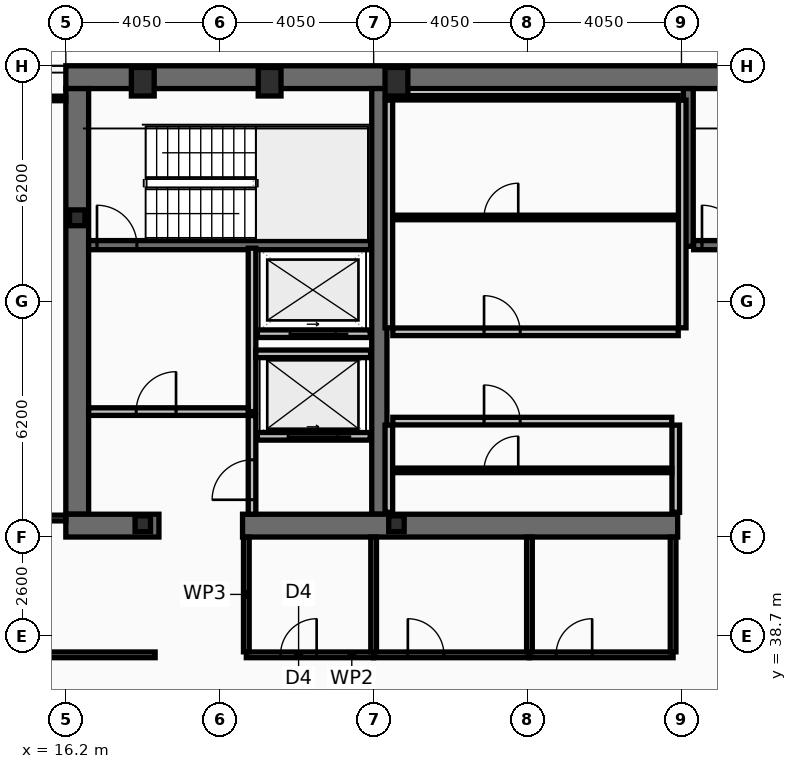
"""IFC4 building model, lengths in metres.
Left out: names, types, materials, properties, quantities, classifications, styles, units other than length and angle.
Written with IfcOpenShell. Run it as: python <this file> out.ifc"""

import sys

from ifc_helpers import new_model, si_unit, direction, frame, frame_2d, origin, origin_2d, place, context, subcontext, project, spatial, rectangle, hollow_rectangle, i_section, extrude, element, fill, save


model = new_model("IFC4")
c1 = context("Model", 3, precision=1e-05, world=origin(), true_north=direction((0.0, 1.0)))
c2 = subcontext(c1, "Body", "Model", "MODEL_VIEW")
j1 = project(units=[si_unit("LENGTHUNIT", "METRE"), si_unit("PLANEANGLEUNIT", "RADIAN")], contexts=[c1])
p1 = place(None, origin())
s1 = spatial("IfcSite", under=j1, at=p1, CompositionType="ELEMENT")
p2 = place(p1, origin())
s2 = spatial("IfcBuilding", under=s1, at=p2, CompositionType="ELEMENT")
p3 = place(p2, frame((0.0, 0.0, 224.6)))
s3 = spatial("IfcBuildingStorey", under=s2, at=p3, CompositionType="ELEMENT", Elevation=224.6)
p4 = place(p3, frame((16.2, 53.4, 0.0), z_axis=(0.0, 0.0, 1.0), x_axis=(1.0, 0.0, 0.0)))
e1 = element("IfcWall", 1, at=p4, inside=s3, PredefinedType="SHEAR", context=c2, shape_type="SweptSolid", body=[
    extrude(rectangle(XDim=40.5, YDim=0.6, at=frame_2d((20.25, 0.0))), origin(), (0.0, 0.0, 1.0), 3.44),
])
p5 = place(p3, frame((16.5, 41.9, 0.0), z_axis=(0.0, 0.0, 1.0), x_axis=(0.0, 1.0, 0.0)))
e2 = element("IfcWall", 2, at=p5, inside=s3, PredefinedType="SHEAR", context=c2, shape_type="SweptSolid", body=[
    extrude(rectangle(XDim=11.2, YDim=0.6, at=frame_2d((5.6, 0.0))), origin(), (0.0, 0.0, 1.0), 3.44),
])
p6 = place(p3, frame((24.45, 41.9, 0.0), z_axis=(0.0, 0.0, 1.0), x_axis=(0.0, 1.0, 0.0)))
e3 = element("IfcWall", 3, at=p6, inside=s3, PredefinedType="SHEAR", context=c2, shape_type="SweptSolid", body=[
    extrude(rectangle(XDim=11.2, YDim=0.4, at=frame_2d((5.6, 0.0))), origin(), (0.0, 0.0, 1.0), 3.44),
])
p7 = place(p3, frame((18.65, 41.6, 0.0), z_axis=(0.0, 0.0, 1.0), x_axis=(-1.0, 0.0, 0.0)))
e4 = element("IfcWall", 4, at=p7, inside=s3, PredefinedType="SHEAR", context=c2, shape_type="SweptSolid", body=[
    extrude(rectangle(XDim=2.45, YDim=0.6, at=frame_2d((1.225, 0.0))), origin(), (0.0, 0.0, 1.0), 3.44),
])
p8 = place(p3, frame((32.3, 41.6, 0.0), z_axis=(0.0, 0.0, 1.0), x_axis=(-1.0, 0.0, 0.0)))
e5 = element("IfcWall", 5, at=p8, inside=s3, PredefinedType="SHEAR", context=c2, shape_type="SweptSolid", body=[
    extrude(rectangle(XDim=11.45, YDim=0.6, at=frame_2d((5.725, 0.0))), origin(), (0.0, 0.0, 1.0), 3.44),
])
p9 = place(p3, frame((32.58, 48.95, 0.0), z_axis=(0.0, 0.0, 1.0), x_axis=(0.0, 1.0, 0.0)))
e6 = element("IfcWall", 6, at=p9, inside=s3, PredefinedType="SHEAR", context=c2, shape_type="SweptSolid", body=[
    extrude(rectangle(XDim=4.15, YDim=0.26, at=frame_2d((2.075, 0.0))), origin(), (0.0, 0.0, 1.0), 3.44),
])
p10 = place(p3, frame((16.8, 48.98, 0.0), z_axis=(0.0, 0.0, 1.0), x_axis=(1.0, 0.0, 0.0)))
e7 = element("IfcWall", 7, at=p10, inside=s3, PredefinedType="SHEAR", context=c2, shape_type="SweptSolid", body=[
    extrude(rectangle(XDim=7.42, YDim=0.24, at=frame_2d((3.71, 0.0))), origin(), (0.0, 0.0, 1.0), 3.44),
])
p11 = place(p10, frame((0.22, 0.0, 0.0)))
e8 = element("IfcOpeningElement", 8, at=p11, cuts=e7, PredefinedType="OPENING", context=c2, shape_type="SweptSolid", body=[
    extrude(rectangle(XDim=1.05, YDim=2.15, at=frame_2d((0.525, 1.075))), frame((0.0, 0.13, 0.0), z_axis=(0.0, -1.0, 0.0), x_axis=(1.0, 0.0, 0.0)), (0.0, 0.0, 1.0), 0.26),
])
p12 = place(p3, frame((32.72, 48.98, 0.0), z_axis=(0.0, 0.0, 1.0), x_axis=(1.0, 0.0, 0.0)))
e9 = element("IfcWall", 9, at=p12, inside=s3, PredefinedType="SHEAR", context=c2, shape_type="SweptSolid", body=[
    extrude(rectangle(XDim=7.56, YDim=0.24, at=frame_2d((3.78, 0.0))), origin(), (0.0, 0.0, 1.0), 3.44),
])
p13 = place(p12, frame((0.22, 0.0, 0.0)))
e10 = element("IfcOpeningElement", 10, at=p13, cuts=e9, PredefinedType="OPENING", context=c2, shape_type="SweptSolid", body=[
    extrude(rectangle(XDim=1.05, YDim=2.15, at=frame_2d((0.525, 1.075))), frame((0.0, 0.13, 0.0), z_axis=(0.0, -1.0, 0.0), x_axis=(1.0, 0.0, 0.0)), (0.0, 0.0, 1.0), 0.26),
])
for number, where, z_axis, x_axis in (
    (11, (18.225, 53.28, 0.0), (0.0, 0.0, 1.0), (1.0, 0.0, 0.0)),
    (12, (21.562, 53.28, 0.0), (0.0, 0.0, 1.0), (1.0, 0.0, 0.0)),
    (13, (24.9, 53.28, 0.0), (0.0, 0.0, 1.0), (1.0, 0.0, 0.0)),
):
    element("IfcColumn", number, at=place(p3, frame(where, z_axis=z_axis, x_axis=x_axis)), inside=s3, PredefinedType="COLUMN", context=c2, shape_type="SweptSolid", body=[
        extrude(hollow_rectangle(XDim=0.6, YDim=0.75, WallThickness=0.045, at=origin_2d()), origin(), (0.0, 0.0, 1.0), 3.6),
    ])
for number, where, z_axis, x_axis in (
    (14, (16.5, 49.7, 0.0), (0.0, 0.0, 1.0), (1.0, 0.0, 0.0)),
    (15, (18.225, 41.65, 0.0), (0.0, 0.0, 1.0), (1.0, 0.0, 0.0)),
    (16, (24.9, 41.65, 0.0), (0.0, 0.0, 1.0), (1.0, 0.0, 0.0)),
):
    element("IfcColumn", number, at=place(p3, frame(where, z_axis=z_axis, x_axis=x_axis)), inside=s3, PredefinedType="COLUMN", context=c2, shape_type="SweptSolid", body=[
        extrude(i_section(OverallWidth=0.406, OverallDepth=0.416, WebThickness=0.03, FlangeThickness=0.048, at=origin_2d()), origin(), (0.0, 0.0, 1.0), 3.6),
    ])
p14 = place(p3, frame((24.21, 43.95, 0.0), z_axis=(0.0, 0.0, 1.0), x_axis=(-1.0, 0.0, 0.0)))
e17 = element("IfcWall", 17, at=p14, inside=s3, PredefinedType="PARTITIONING", context=c2, shape_type="SweptSolid", body=[
    extrude(rectangle(XDim=2.97, YDim=0.2, at=frame_2d((1.485, 0.0))), origin(), (0.0, 0.0, 1.0), 3.44),
])
p15 = place(p14, frame((0.86, 0.0, 0.0)))
e18 = element("IfcOpeningElement", 18, at=p15, cuts=e17, PredefinedType="OPENING", context=c2, shape_type="SweptSolid", body=[
    extrude(rectangle(XDim=1.3, YDim=2.18, at=frame_2d((0.65, 1.09))), frame((0.0, 0.11, 0.0), z_axis=(0.0, -1.0, 0.0), x_axis=(1.0, 0.0, 0.0)), (0.0, 0.0, 1.0), 0.22),
])
p16 = place(p3, frame((24.21, 46.65, 0.0), z_axis=(0.0, 0.0, 1.0), x_axis=(-1.0, 0.0, 0.0)))
e19 = element("IfcWall", 19, at=p16, inside=s3, PredefinedType="PARTITIONING", context=c2, shape_type="SweptSolid", body=[
    extrude(rectangle(XDim=2.97, YDim=0.2, at=frame_2d((1.485, 0.0))), origin(), (0.0, 0.0, 1.0), 3.44),
])
p17 = place(p16, frame((0.91, 0.0, 0.0)))
e20 = element("IfcOpeningElement", 20, at=p17, cuts=e19, PredefinedType="OPENING", context=c2, shape_type="SweptSolid", body=[
    extrude(rectangle(XDim=1.2, YDim=2.18, at=frame_2d((0.6, 1.09))), frame((0.0, 0.11, 0.0), z_axis=(0.0, -1.0, 0.0), x_axis=(1.0, 0.0, 0.0)), (0.0, 0.0, 1.0), 0.22),
])
p18 = place(p3, frame((21.1, 44.6, 0.0), z_axis=(0.0, 0.0, 1.0), x_axis=(0.0, 1.0, 0.0)))
e21 = element("IfcWall", 21, at=p18, inside=s3, PredefinedType="PARTITIONING", context=c2, shape_type="SweptSolid", body=[
    extrude(rectangle(XDim=4.3, YDim=0.2, at=frame_2d((2.15, 0.0))), origin(), (0.0, 0.0, 1.0), 3.44),
])
p19 = place(p3, frame((16.8, 44.6, 0.0), z_axis=(0.0, 0.0, 1.0), x_axis=(1.0, 0.0, 0.0)))
e22 = element("IfcWall", 22, at=p19, inside=s3, PredefinedType="PARTITIONING", context=c2, shape_type="SweptSolid", body=[
    extrude(rectangle(XDim=4.2, YDim=0.2, at=frame_2d((2.1, 0.0))), origin(), (0.0, 0.0, 1.0), 3.44),
])
p20 = place(p19, frame((1.25, 0.0, 0.0)))
e23 = element("IfcOpeningElement", 23, at=p20, cuts=e22, PredefinedType="OPENING", context=c2, shape_type="SweptSolid", body=[
    extrude(rectangle(XDim=1.05, YDim=2.15, at=frame_2d((0.525, 1.075))), frame((0.0, 0.11, 0.0), z_axis=(0.0, -1.0, 0.0), x_axis=(1.0, 0.0, 0.0)), (0.0, 0.0, 1.0), 0.22),
])
p21 = place(p3, frame((21.2, 46.12, 0.0), z_axis=(0.0, 0.0, 1.0), x_axis=(1.0, 0.0, 0.0)))
e24 = element("IfcWall", 24, at=p21, inside=s3, PredefinedType="PARTITIONING", context=c2, shape_type="SweptSolid", body=[
    extrude(rectangle(XDim=3.02, YDim=0.2, at=frame_2d((1.51, 0.0))), origin(), (0.0, 0.0, 1.0), 3.44),
])
p22 = place(p3, frame((21.1, 41.9, 0.0), z_axis=(0.0, 0.0, 1.0), x_axis=(0.0, 1.0, 0.0)))
e25 = element("IfcWall", 25, at=p22, inside=s3, PredefinedType="PARTITIONING", context=c2, shape_type="SweptSolid", body=[
    extrude(rectangle(XDim=2.595, YDim=0.2, at=frame_2d((1.298, 0.0))), origin(), (0.0, 0.0, 1.0), 3.44),
])
p23 = place(p22, frame((0.38, 0.0, 0.0)))
e26 = element("IfcOpeningElement", 26, at=p23, cuts=e25, PredefinedType="OPENING", context=c2, shape_type="SweptSolid", body=[
    extrude(rectangle(XDim=1.05, YDim=2.15, at=frame_2d((0.525, 1.075))), frame((0.0, 0.11, 0.0), z_axis=(0.0, -1.0, 0.0), x_axis=(1.0, 0.0, 0.0)), (0.0, 0.0, 1.0), 0.22),
])
for number, where, z_axis, x_axis in (
    (27, (24.7, 46.805, 0.0), (0.0, 0.0, 1.0), (0.0, 1.0, 0.0)),
    (28, (32.42, 46.805, 0.0), (0.0, 0.0, 1.0), (0.0, 1.0, 0.0)),
):
    element("IfcWall", number, at=place(p3, frame(where, z_axis=z_axis, x_axis=x_axis)), inside=s3, PredefinedType="PARTITIONING", context=c2, shape_type="SweptSolid", body=[
        extrude(rectangle(XDim=5.99, YDim=0.2, at=frame_2d((2.995, 0.0))), origin(), (0.0, 0.0, 1.0), 3.44),
    ])
p24 = place(p3, frame((24.805, 52.86, 0.0), z_axis=(0.0, 0.0, 1.0), x_axis=(1.0, 0.0, 0.0)))
e29 = element("IfcWall", 29, at=p24, inside=s3, PredefinedType="PARTITIONING", context=c2, shape_type="SweptSolid", body=[
    extrude(rectangle(XDim=7.51, YDim=0.12, at=frame_2d((3.755, 0.0))), origin(), (0.0, 0.0, 1.0), 3.44),
])
p25 = place(p3, frame((24.805, 49.709, 0.0), z_axis=(0.0, 0.0, 1.0), x_axis=(1.0, 0.0, 0.0)))
e30 = element("IfcWall", 30, at=p25, inside=s3, PredefinedType="PARTITIONING", context=c2, shape_type="SweptSolid", body=[
    extrude(rectangle(XDim=7.51, YDim=0.12, at=frame_2d((3.755, 0.0))), origin(), (0.0, 0.0, 1.0), 3.44),
])
p26 = place(p25, frame((2.4, 0.0, 0.0)))
e31 = element("IfcOpeningElement", 31, at=p26, cuts=e30, PredefinedType="OPENING", context=c2, shape_type="SweptSolid", body=[
    extrude(rectangle(XDim=0.9, YDim=2.05, at=frame_2d((0.45, 1.025))), frame((0.0, 0.07, 0.0), z_axis=(0.0, -1.0, 0.0), x_axis=(1.0, 0.0, 0.0)), (0.0, 0.0, 1.0), 0.14),
])
p27 = place(p3, frame((24.805, 46.7, 0.0), z_axis=(0.0, 0.0, 1.0), x_axis=(1.0, 0.0, 0.0)))
e32 = element("IfcWall", 32, at=p27, inside=s3, PredefinedType="PARTITIONING", context=c2, shape_type="SweptSolid", body=[
    extrude(rectangle(XDim=7.51, YDim=0.2, at=frame_2d((3.755, 0.0))), origin(), (0.0, 0.0, 1.0), 3.44),
])
p28 = place(p27, frame((2.4, 0.0, 0.0)))
e33 = element("IfcOpeningElement", 33, at=p28, cuts=e32, PredefinedType="OPENING", context=c2, shape_type="SweptSolid", body=[
    extrude(rectangle(XDim=0.95, YDim=2.1, at=frame_2d((0.475, 1.05))), frame((0.0, 0.11, 0.0), z_axis=(0.0, -1.0, 0.0), x_axis=(1.0, 0.0, 0.0)), (0.0, 0.0, 1.0), 0.22),
])
for number, where, z_axis, x_axis in (
    (34, (24.7, 41.95, 0.0), (0.0, 0.0, 1.0), (0.0, 1.0, 0.0)),
    (35, (32.25, 41.95, 0.0), (0.0, 0.0, 1.0), (0.0, 1.0, 0.0)),
):
    element("IfcWall", number, at=place(p3, frame(where, z_axis=z_axis, x_axis=x_axis)), inside=s3, PredefinedType="PARTITIONING", context=c2, shape_type="SweptSolid", body=[
        extrude(rectangle(XDim=2.295, YDim=0.2, at=frame_2d((1.147, 0.0))), origin(), (0.0, 0.0, 1.0), 3.44),
    ])
p29 = place(p3, frame((24.805, 43.054, 0.0), z_axis=(0.0, 0.0, 1.0), x_axis=(1.0, 0.0, 0.0)))
e36 = element("IfcWall", 36, at=p29, inside=s3, PredefinedType="PARTITIONING", context=c2, shape_type="SweptSolid", body=[
    extrude(rectangle(XDim=7.34, YDim=0.12, at=frame_2d((3.67, 0.0))), origin(), (0.0, 0.0, 1.0), 3.44),
])
p30 = place(p29, frame((2.4, 0.0, 0.0)))
e37 = element("IfcOpeningElement", 37, at=p30, cuts=e36, PredefinedType="OPENING", context=c2, shape_type="SweptSolid", body=[
    extrude(rectangle(XDim=0.9, YDim=2.05, at=frame_2d((0.45, 1.025))), frame((0.0, 0.07, 0.0), z_axis=(0.0, -1.0, 0.0), x_axis=(1.0, 0.0, 0.0)), (0.0, 0.0, 1.0), 0.14),
])
p31 = place(p3, frame((24.805, 44.35, 0.0), z_axis=(0.0, 0.0, 1.0), x_axis=(1.0, 0.0, 0.0)))
e38 = element("IfcWall", 38, at=p31, inside=s3, PredefinedType="PARTITIONING", context=c2, shape_type="SweptSolid", body=[
    extrude(rectangle(XDim=7.34, YDim=0.2, at=frame_2d((3.67, 0.0))), origin(), (0.0, 0.0, 1.0), 3.44),
])
p32 = place(p31, frame((2.4, 0.0, 0.0)))
e39 = element("IfcOpeningElement", 39, at=p32, cuts=e38, PredefinedType="OPENING", context=c2, shape_type="SweptSolid", body=[
    extrude(rectangle(XDim=0.95, YDim=2.1, at=frame_2d((0.475, 1.05))), frame((0.0, 0.11, 0.0), z_axis=(0.0, -1.0, 0.0), x_axis=(1.0, 0.0, 0.0)), (0.0, 0.0, 1.0), 0.22),
])
p33 = place(p3, frame((20.95, 38.2, 0.0), z_axis=(0.0, 0.0, 1.0), x_axis=(1.0, 0.0, 0.0)))
e40 = element("IfcWall", 40, at=p33, inside=s3, PredefinedType="PARTITIONING", context=c2, shape_type="SweptSolid", body=[
    extrude(rectangle(XDim=3.35, YDim=0.15, at=frame_2d((1.675, 0.0))), origin(), (0.0, 0.0, 1.0), 3.44),
])
p34 = place(p33, frame((0.9, 0.0, 0.0)))
e41 = element("IfcOpeningElement", 41, at=p34, cuts=e40, PredefinedType="OPENING", context=c2, shape_type="SweptSolid", body=[
    extrude(rectangle(XDim=0.95, YDim=2.05, at=frame_2d((0.475, 1.025))), frame((0.0, 0.085, 0.0), z_axis=(0.0, -1.0, 0.0), x_axis=(1.0, 0.0, 0.0)), (0.0, 0.0, 1.0), 0.17),
])
p35 = place(p3, frame((24.3, 38.2, 0.0), z_axis=(0.0, 0.0, 1.0), x_axis=(1.0, 0.0, 0.0)))
e42 = element("IfcWall", 42, at=p35, inside=s3, PredefinedType="PARTITIONING", context=c2, shape_type="SweptSolid", body=[
    extrude(rectangle(XDim=4.1, YDim=0.15, at=frame_2d((2.05, 0.0))), origin(), (0.0, 0.0, 1.0), 2.78),
])
p36 = place(p35, frame((0.9, 0.0, 0.0)))
e43 = element("IfcOpeningElement", 43, at=p36, cuts=e42, PredefinedType="OPENING", context=c2, shape_type="SweptSolid", body=[
    extrude(rectangle(XDim=0.95, YDim=2.05, at=frame_2d((0.475, 1.025))), frame((0.0, 0.085, 0.0), z_axis=(0.0, -1.0, 0.0), x_axis=(1.0, 0.0, 0.0)), (0.0, 0.0, 1.0), 0.17),
])
p37 = place(p3, frame((28.4, 38.2, 0.0), z_axis=(0.0, 0.0, 1.0), x_axis=(1.0, 0.0, 0.0)))
e44 = element("IfcWall", 44, at=p37, inside=s3, PredefinedType="PARTITIONING", context=c2, shape_type="SweptSolid", body=[
    extrude(rectangle(XDim=3.78, YDim=0.15, at=frame_2d((1.89, 0.0))), origin(), (0.0, 0.0, 1.0), 2.78),
])
p38 = place(p37, frame((0.7, 0.0, 0.0)))
e45 = element("IfcOpeningElement", 45, at=p38, cuts=e44, PredefinedType="OPENING", context=c2, shape_type="SweptSolid", body=[
    extrude(rectangle(XDim=0.95, YDim=2.05, at=frame_2d((0.475, 1.025))), frame((0.0, 0.085, 0.0), z_axis=(0.0, -1.0, 0.0), x_axis=(1.0, 0.0, 0.0)), (0.0, 0.0, 1.0), 0.17),
])
for number, where, z_axis, x_axis in (
    (46, (20.95, 38.28, 0.0), (0.0, 0.0, 1.0), (0.0, 1.0, 0.0)),
    (47, (24.3, 38.28, 0.0), (0.0, 0.0, 1.0), (0.0, 1.0, 0.0)),
    (48, (28.4, 38.28, 0.0), (0.0, 0.0, 1.0), (0.0, 1.0, 0.0)),
    (49, (32.18, 38.28, 0.0), (0.0, 0.0, 1.0), (0.0, 1.0, 0.0)),
):
    element("IfcWall", number, at=place(p3, frame(where, z_axis=z_axis, x_axis=x_axis)), inside=s3, PredefinedType="PARTITIONING", context=c2, shape_type="SweptSolid", body=[
        extrude(rectangle(XDim=3.02, YDim=0.15, at=frame_2d((1.51, 0.0))), origin(), (0.0, 0.0, 1.0), 3.44),
    ])
p39 = place(p3, frame((8.03, 38.2, 0.0), z_axis=(0.0, 0.0, 1.0), x_axis=(1.0, 0.0, 0.0)))
e50 = element("IfcWall", 50, at=p39, inside=s3, PredefinedType="PARTITIONING", context=c2, shape_type="SweptSolid", body=[
    extrude(rectangle(XDim=10.52, YDim=0.15, at=frame_2d((5.26, 0.0))), origin(), (0.0, 0.0, 1.0), 2.78),
])
p40 = place(p39, frame((6.32, 0.0, 0.0)))
e51 = element("IfcOpeningElement", 51, at=p40, cuts=e50, PredefinedType="OPENING", context=c2, shape_type="SweptSolid", body=[
    extrude(rectangle(XDim=0.95, YDim=2.05, at=frame_2d((0.475, 1.025))), frame((0.0, 0.085, 0.0), z_axis=(0.0, -1.0, 0.0), x_axis=(1.0, 0.0, 0.0)), (0.0, 0.0, 1.0), 0.17),
])
p41 = place(p3, frame((8.095, 41.8, 0.0), z_axis=(0.0, 0.0, 1.0), x_axis=(1.0, 0.0, 0.0)))
e52 = element("IfcWall", 52, at=p41, inside=s3, PredefinedType="PARTITIONING", context=c2, shape_type="SweptSolid", body=[
    extrude(rectangle(XDim=8.105, YDim=0.15, at=frame_2d((4.052, 0.0))), origin(), (0.0, 0.0, 1.0), 3.44),
])
p42 = place(p41, frame((6.32, 0.0, 0.0)))
e53 = element("IfcOpeningElement", 53, at=p42, cuts=e52, PredefinedType="OPENING", context=c2, shape_type="SweptSolid", body=[
    extrude(rectangle(XDim=0.9, YDim=2.05, at=frame_2d((0.45, 1.025))), frame((0.0, 0.085, 0.0), z_axis=(0.0, -1.0, 0.0), x_axis=(1.0, 0.0, 0.0)), (0.0, 0.0, 1.0), 0.17),
])
p43 = place(p3, frame((8.095, 52.84, 0.0), z_axis=(0.0, 0.0, 1.0), x_axis=(1.0, 0.0, 0.0)))
e54 = element("IfcWall", 54, at=p43, inside=s3, PredefinedType="PARTITIONING", context=c2, shape_type="SweptSolid", body=[
    extrude(rectangle(XDim=8.105, YDim=0.12, at=frame_2d((4.052, 0.0))), origin(), (0.0, 0.0, 1.0), 3.44),
])
p44 = place(p11, origin())
e55 = element("IfcDoor", 55, at=p44, inside=s3, OperationType="SINGLE_SWING_LEFT", PredefinedType="DOOR", context=c2, shape_type="SweptSolid", body=[
    extrude(rectangle(XDim=1.05, YDim=2.15, at=frame_2d((0.525, 1.075))), frame((0.0, 0.025, 0.0), z_axis=(0.0, -1.0, 0.0), x_axis=(1.0, 0.0, 0.0)), (0.0, 0.0, 1.0), 0.05),
])
fill(e8, e55)
p45 = place(p13, origin())
e56 = element("IfcDoor", 56, at=p45, inside=s3, OperationType="SINGLE_SWING_LEFT", PredefinedType="DOOR", context=c2, shape_type="SweptSolid", body=[
    extrude(rectangle(XDim=1.05, YDim=2.15, at=frame_2d((0.525, 1.075))), frame((0.0, 0.025, 0.0), z_axis=(0.0, -1.0, 0.0), x_axis=(1.0, 0.0, 0.0)), (0.0, 0.0, 1.0), 0.05),
])
fill(e10, e56)
p46 = place(p15, origin())
e57 = element("IfcDoor", 57, at=p46, inside=s3, OperationType="SLIDING_TO_LEFT", PredefinedType="DOOR", context=c2, shape_type="SweptSolid", body=[
    extrude(rectangle(XDim=1.3, YDim=2.18, at=frame_2d((0.65, 1.09))), frame((0.0, 0.025, 0.0), z_axis=(0.0, -1.0, 0.0), x_axis=(1.0, 0.0, 0.0)), (0.0, 0.0, 1.0), 0.05),
])
fill(e18, e57)
p47 = place(p17, origin())
e58 = element("IfcDoor", 58, at=p47, inside=s3, OperationType="SLIDING_TO_LEFT", PredefinedType="DOOR", context=c2, shape_type="SweptSolid", body=[
    extrude(rectangle(XDim=1.2, YDim=2.18, at=frame_2d((0.6, 1.09))), frame((0.0, 0.025, 0.0), z_axis=(0.0, -1.0, 0.0), x_axis=(1.0, 0.0, 0.0)), (0.0, 0.0, 1.0), 0.05),
])
fill(e20, e58)
p48 = place(p20, origin())
e59 = element("IfcDoor", 59, at=p48, inside=s3, OperationType="SINGLE_SWING_RIGHT", PredefinedType="DOOR", context=c2, shape_type="SweptSolid", body=[
    extrude(rectangle(XDim=1.05, YDim=2.15, at=frame_2d((0.525, 1.075))), frame((0.0, 0.025, 0.0), z_axis=(0.0, -1.0, 0.0), x_axis=(1.0, 0.0, 0.0)), (0.0, 0.0, 1.0), 0.05),
])
fill(e23, e59)
p49 = place(p23, origin())
e60 = element("IfcDoor", 60, at=p49, inside=s3, OperationType="SINGLE_SWING_LEFT", PredefinedType="DOOR", context=c2, shape_type="SweptSolid", body=[
    extrude(rectangle(XDim=1.05, YDim=2.15, at=frame_2d((0.525, 1.075))), frame((0.0, 0.025, 0.0), z_axis=(0.0, -1.0, 0.0), x_axis=(1.0, 0.0, 0.0)), (0.0, 0.0, 1.0), 0.05),
])
fill(e26, e60)
p50 = place(p26, origin())
e61 = element("IfcDoor", 61, at=p50, inside=s3, OperationType="SINGLE_SWING_RIGHT", PredefinedType="DOOR", context=c2, shape_type="SweptSolid", body=[
    extrude(rectangle(XDim=0.9, YDim=2.05, at=frame_2d((0.45, 1.025))), frame((0.0, 0.025, 0.0), z_axis=(0.0, -1.0, 0.0), x_axis=(1.0, 0.0, 0.0)), (0.0, 0.0, 1.0), 0.05),
])
fill(e31, e61)
p51 = place(p28, origin())
e62 = element("IfcDoor", 62, at=p51, inside=s3, OperationType="SINGLE_SWING_LEFT", PredefinedType="DOOR", context=c2, shape_type="SweptSolid", body=[
    extrude(rectangle(XDim=0.95, YDim=2.1, at=frame_2d((0.475, 1.05))), frame((0.0, 0.025, 0.0), z_axis=(0.0, -1.0, 0.0), x_axis=(1.0, 0.0, 0.0)), (0.0, 0.0, 1.0), 0.05),
])
fill(e33, e62)
p52 = place(p30, origin())
e63 = element("IfcDoor", 63, at=p52, inside=s3, OperationType="SINGLE_SWING_RIGHT", PredefinedType="DOOR", context=c2, shape_type="SweptSolid", body=[
    extrude(rectangle(XDim=0.9, YDim=2.05, at=frame_2d((0.45, 1.025))), frame((0.0, 0.025, 0.0), z_axis=(0.0, -1.0, 0.0), x_axis=(1.0, 0.0, 0.0)), (0.0, 0.0, 1.0), 0.05),
])
fill(e37, e63)
p53 = place(p32, origin())
e64 = element("IfcDoor", 64, at=p53, inside=s3, OperationType="SINGLE_SWING_LEFT", PredefinedType="DOOR", context=c2, shape_type="SweptSolid", body=[
    extrude(rectangle(XDim=0.95, YDim=2.1, at=frame_2d((0.475, 1.05))), frame((0.0, 0.025, 0.0), z_axis=(0.0, -1.0, 0.0), x_axis=(1.0, 0.0, 0.0)), (0.0, 0.0, 1.0), 0.05),
])
fill(e39, e64)
p54 = place(p34, origin())
e65 = element("IfcDoor", 65, at=p54, inside=s3, OperationType="SINGLE_SWING_RIGHT", PredefinedType="DOOR", context=c2, shape_type="SweptSolid", body=[
    extrude(rectangle(XDim=0.95, YDim=2.05, at=frame_2d((0.475, 1.025))), frame((0.0, 0.025, 0.0), z_axis=(0.0, -1.0, 0.0), x_axis=(1.0, 0.0, 0.0)), (0.0, 0.0, 1.0), 0.05),
])
fill(e41, e65)
p55 = place(p36, origin())
e66 = element("IfcDoor", 66, at=p55, inside=s3, OperationType="SINGLE_SWING_LEFT", PredefinedType="DOOR", context=c2, shape_type="SweptSolid", body=[
    extrude(rectangle(XDim=0.95, YDim=2.05, at=frame_2d((0.475, 1.025))), frame((0.0, 0.025, 0.0), z_axis=(0.0, -1.0, 0.0), x_axis=(1.0, 0.0, 0.0)), (0.0, 0.0, 1.0), 0.05),
])
fill(e43, e66)
p56 = place(p38, origin())
e67 = element("IfcDoor", 67, at=p56, inside=s3, OperationType="SINGLE_SWING_RIGHT", PredefinedType="DOOR", context=c2, shape_type="SweptSolid", body=[
    extrude(rectangle(XDim=0.95, YDim=2.05, at=frame_2d((0.475, 1.025))), frame((0.0, 0.025, 0.0), z_axis=(0.0, -1.0, 0.0), x_axis=(1.0, 0.0, 0.0)), (0.0, 0.0, 1.0), 0.05),
])
fill(e45, e67)
save(model, sys.argv[1])
